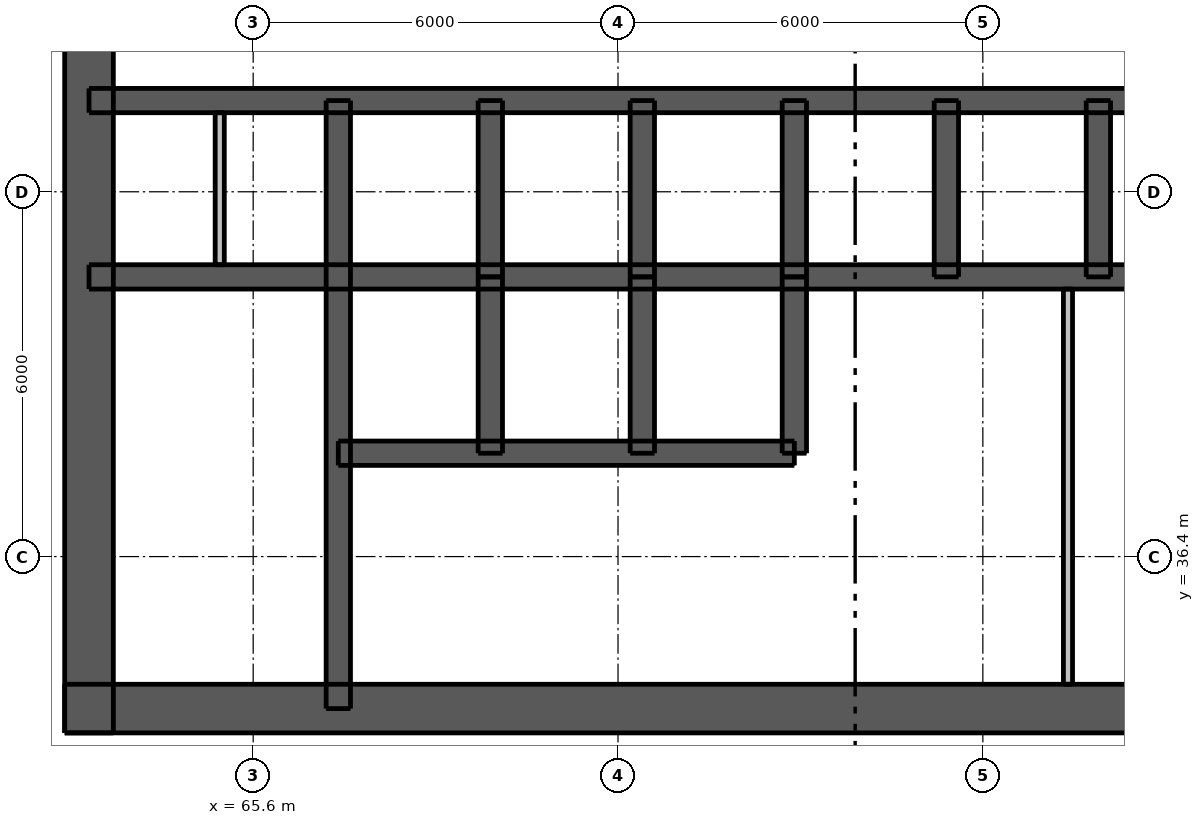
"""IFC4 building model, lengths in metres.
Left out: names, types, materials, properties, quantities, classifications, styles, units other than length and angle.
Written with IfcOpenShell. Run it as: python <this file> out.ifc"""

import sys

from ifc_helpers import new_model, si_unit, direction, frame, frame_2d, origin, place, context, subcontext, project, spatial, rectangle, extrude, element, fill, save


model = new_model("IFC4")
c1 = context("Model", 3, precision=1e-05, world=origin(), true_north=direction((0.0, 1.0)))
c2 = subcontext(c1, "Body", "Model", "MODEL_VIEW")
j1 = project(units=[si_unit("LENGTHUNIT", "METRE"), si_unit("PLANEANGLEUNIT", "RADIAN")], contexts=[c1])
p1 = place(None, origin())
s1 = spatial("IfcSite", under=j1, at=p1, CompositionType="ELEMENT")
p2 = place(p1, origin())
s2 = spatial("IfcBuilding", under=s1, at=p2, CompositionType="ELEMENT")
p3 = place(p2, frame((0.0, 0.0, 78.7)))
s3 = spatial("IfcBuildingStorey", under=s2, at=p3, CompositionType="ELEMENT", Elevation=78.7)
p4 = place(p3, frame((62.5, 33.9, 0.0), z_axis=(0.0, 0.0, 1.0), x_axis=(1.0, 0.0, 0.0)))
e1 = element("IfcWall", 1, at=p4, inside=s3, PredefinedType="SHEAR", context=c2, shape_type="SweptSolid", body=[
    extrude(rectangle(XDim=24.0, YDim=0.8, at=frame_2d((12.0, 0.0))), origin(), (0.0, 0.0, 1.0), 3.05),
])
p5 = place(p4, frame((2.0, 0.0, 0.0)))
e2 = element("IfcOpeningElement", 2, at=p5, cuts=e1, PredefinedType="OPENING", context=c2, shape_type="SweptSolid", body=[
    extrude(rectangle(XDim=1.1, YDim=2.1, at=frame_2d((0.55, 1.05))), frame((0.0, 0.41, 0.0), z_axis=(0.0, -1.0, 0.0), x_axis=(1.0, 0.0, 0.0)), (0.0, 0.0, 1.0), 0.82),
])
p6 = place(p4, frame((20.9, 0.0, 0.0)))
e3 = element("IfcOpeningElement", 3, at=p6, cuts=e1, PredefinedType="OPENING", context=c2, shape_type="SweptSolid", body=[
    extrude(rectangle(XDim=1.1, YDim=2.1, at=frame_2d((0.55, 1.05))), frame((0.0, 0.41, 0.0), z_axis=(0.0, -1.0, 0.0), x_axis=(1.0, 0.0, 0.0)), (0.0, 0.0, 1.0), 0.82),
])
p7 = place(p4, frame((8.0, 0.0, 0.0)))
e4 = element("IfcOpeningElement", 4, at=p7, cuts=e1, PredefinedType="OPENING", context=c2, shape_type="SweptSolid", body=[
    extrude(rectangle(XDim=1.1, YDim=2.1, at=frame_2d((0.55, 1.05))), frame((0.0, 0.41, 0.0), z_axis=(0.0, -1.0, 0.0), x_axis=(1.0, 0.0, 0.0)), (0.0, 0.0, 1.0), 0.82),
])
p8 = place(p4, frame((17.488, 0.0, 0.0)))
e5 = element("IfcOpeningElement", 5, at=p8, cuts=e1, PredefinedType="OPENING", context=c2, shape_type="SweptSolid", body=[
    extrude(rectangle(XDim=0.9, YDim=2.1, at=frame_2d((0.45, 1.05))), frame((0.0, 0.41, 0.0), z_axis=(0.0, -1.0, 0.0), x_axis=(1.0, 0.0, 0.0)), (0.0, 0.0, 1.0), 0.82),
])
p9 = place(p3, frame((62.9, 33.5, 0.0), z_axis=(0.0, 0.0, 1.0), x_axis=(0.0, 1.0, 0.0)))
e6 = element("IfcWall", 6, at=p9, inside=s3, PredefinedType="SHEAR", context=c2, shape_type="SweptSolid", body=[
    extrude(rectangle(XDim=24.0, YDim=0.8, at=frame_2d((12.0, 0.0))), origin(), (0.0, 0.0, 1.0), 3.05),
])
p10 = place(p9, frame((11.2, 0.0, 0.0)))
e7 = element("IfcOpeningElement", 7, at=p10, cuts=e6, PredefinedType="OPENING", context=c2, shape_type="SweptSolid", body=[
    extrude(rectangle(XDim=1.6, YDim=2.1, at=frame_2d((0.8, 1.05))), frame((0.0, 0.41, 0.0), z_axis=(0.0, -1.0, 0.0), x_axis=(1.0, 0.0, 0.0)), (0.0, 0.0, 1.0), 0.82),
])
p11 = place(p3, frame((62.9, 41.0, 0.0), z_axis=(0.0, 0.0, 1.0), x_axis=(1.0, 0.0, 0.0)))
e8 = element("IfcWall", 8, at=p11, inside=s3, PredefinedType="SHEAR", context=c2, shape_type="SweptSolid", body=[
    extrude(rectangle(XDim=23.2, YDim=0.4, at=frame_2d((11.6, 0.0))), origin(), (0.0, 0.0, 1.0), 3.05),
])
p12 = place(p3, frame((62.9, 43.9, 0.0), z_axis=(0.0, 0.0, 1.0), x_axis=(1.0, 0.0, 0.0)))
e9 = element("IfcWall", 9, at=p12, inside=s3, PredefinedType="SHEAR", context=c2, shape_type="SweptSolid", body=[
    extrude(rectangle(XDim=23.2, YDim=0.4, at=frame_2d((11.6, 0.0))), origin(), (0.0, 0.0, 1.0), 3.05),
])
p13 = place(p12, frame((0.825, 0.0, 0.0)))
e10 = element("IfcOpeningElement", 10, at=p13, cuts=e9, PredefinedType="OPENING", context=c2, shape_type="SweptSolid", body=[
    extrude(rectangle(XDim=0.9, YDim=2.1, at=frame_2d((0.45, 1.05))), frame((0.0, 0.21, 0.0), z_axis=(0.0, -1.0, 0.0), x_axis=(1.0, 0.0, 0.0)), (0.0, 0.0, 1.0), 0.42),
])
p14 = place(p12, frame((2.575, 0.0, 0.0)))
e11 = element("IfcOpeningElement", 11, at=p14, cuts=e9, PredefinedType="OPENING", context=c2, shape_type="SweptSolid", body=[
    extrude(rectangle(XDim=0.9, YDim=2.1, at=frame_2d((0.45, 1.05))), frame((0.0, 0.21, 0.0), z_axis=(0.0, -1.0, 0.0), x_axis=(1.0, 0.0, 0.0)), (0.0, 0.0, 1.0), 0.42),
])
p15 = place(p12, frame((20.6, 0.0, 0.0)))
e12 = element("IfcOpeningElement", 12, at=p15, cuts=e9, PredefinedType="OPENING", context=c2, shape_type="SweptSolid", body=[
    extrude(rectangle(XDim=0.9, YDim=2.1, at=frame_2d((0.45, 1.05))), frame((0.0, 0.21, 0.0), z_axis=(0.0, -1.0, 0.0), x_axis=(1.0, 0.0, 0.0)), (0.0, 0.0, 1.0), 0.42),
])
p16 = place(p12, frame((4.8, 0.0, 0.0)))
e13 = element("IfcOpeningElement", 13, at=p16, cuts=e9, PredefinedType="OPENING", context=c2, shape_type="SweptSolid", body=[
    extrude(rectangle(XDim=1.1, YDim=2.1, at=frame_2d((0.55, 1.05))), frame((0.0, 0.21, 0.0), z_axis=(0.0, -1.0, 0.0), x_axis=(1.0, 0.0, 0.0)), (0.0, 0.0, 1.0), 0.42),
])
p17 = place(p12, frame((7.3, 0.0, 0.0)))
e14 = element("IfcOpeningElement", 14, at=p17, cuts=e9, PredefinedType="OPENING", context=c2, shape_type="SweptSolid", body=[
    extrude(rectangle(XDim=1.1, YDim=2.1, at=frame_2d((0.55, 1.05))), frame((0.0, 0.21, 0.0), z_axis=(0.0, -1.0, 0.0), x_axis=(1.0, 0.0, 0.0)), (0.0, 0.0, 1.0), 0.42),
])
p18 = place(p12, frame((9.8, 0.0, 0.0)))
e15 = element("IfcOpeningElement", 15, at=p18, cuts=e9, PredefinedType="OPENING", context=c2, shape_type="SweptSolid", body=[
    extrude(rectangle(XDim=1.1, YDim=2.1, at=frame_2d((0.55, 1.05))), frame((0.0, 0.21, 0.0), z_axis=(0.0, -1.0, 0.0), x_axis=(1.0, 0.0, 0.0)), (0.0, 0.0, 1.0), 0.42),
])
p19 = place(p12, frame((12.3, 0.0, 0.0)))
e16 = element("IfcOpeningElement", 16, at=p19, cuts=e9, PredefinedType="OPENING", context=c2, shape_type="SweptSolid", body=[
    extrude(rectangle(XDim=1.1, YDim=2.1, at=frame_2d((0.55, 1.05))), frame((0.0, 0.21, 0.0), z_axis=(0.0, -1.0, 0.0), x_axis=(1.0, 0.0, 0.0)), (0.0, 0.0, 1.0), 0.42),
])
p20 = place(p12, frame((14.8, 0.0, 0.0)))
e17 = element("IfcOpeningElement", 17, at=p20, cuts=e9, PredefinedType="OPENING", context=c2, shape_type="SweptSolid", body=[
    extrude(rectangle(XDim=1.1, YDim=2.1, at=frame_2d((0.55, 1.05))), frame((0.0, 0.21, 0.0), z_axis=(0.0, -1.0, 0.0), x_axis=(1.0, 0.0, 0.0)), (0.0, 0.0, 1.0), 0.42),
])
p21 = place(p12, frame((17.3, 0.0, 0.0)))
e18 = element("IfcOpeningElement", 18, at=p21, cuts=e9, PredefinedType="OPENING", context=c2, shape_type="SweptSolid", body=[
    extrude(rectangle(XDim=1.1, YDim=2.1, at=frame_2d((0.55, 1.05))), frame((0.0, 0.21, 0.0), z_axis=(0.0, -1.0, 0.0), x_axis=(1.0, 0.0, 0.0)), (0.0, 0.0, 1.0), 0.42),
])
p22 = place(p3, frame((67.0, 33.9, 0.0), z_axis=(0.0, 0.0, 1.0), x_axis=(0.0, 1.0, 0.0)))
e19 = element("IfcWall", 19, at=p22, inside=s3, PredefinedType="SHEAR", context=c2, shape_type="SweptSolid", body=[
    extrude(rectangle(XDim=10.0, YDim=0.4, at=frame_2d((5.0, 0.0))), origin(), (0.0, 0.0, 1.0), 3.05),
])
p23 = place(p22, frame((0.6, 0.0, 0.0)))
e20 = element("IfcOpeningElement", 20, at=p23, cuts=e19, PredefinedType="OPENING", context=c2, shape_type="SweptSolid", body=[
    extrude(rectangle(XDim=1.1, YDim=2.1, at=frame_2d((0.55, 1.05))), frame((0.0, 0.21, 0.0), z_axis=(0.0, -1.0, 0.0), x_axis=(1.0, 0.0, 0.0)), (0.0, 0.0, 1.0), 0.42),
])
for number, where, z_axis, x_axis in (
    (21, (69.5, 41.0, 0.0), (0.0, 0.0, 1.0), (0.0, 1.0, 0.0)),
    (22, (72.0, 41.0, 0.0), (0.0, 0.0, 1.0), (0.0, 1.0, 0.0)),
    (23, (74.5, 41.0, 0.0), (0.0, 0.0, 1.0), (0.0, 1.0, 0.0)),
    (24, (77.0, 41.0, 0.0), (0.0, 0.0, 1.0), (0.0, 1.0, 0.0)),
    (25, (79.5, 41.0, 0.0), (0.0, 0.0, 1.0), (0.0, 1.0, 0.0)),
):
    element("IfcWall", number, at=place(p3, frame(where, z_axis=z_axis, x_axis=x_axis)), inside=s3, PredefinedType="SHEAR", context=c2, shape_type="SweptSolid", body=[
        extrude(rectangle(XDim=2.9, YDim=0.4, at=frame_2d((1.45, 0.0))), origin(), (0.0, 0.0, 1.0), 3.05),
    ])
p24 = place(p3, frame((67.0, 38.1, 0.0), z_axis=(0.0, 0.0, 1.0), x_axis=(1.0, 0.0, 0.0)))
e26 = element("IfcWall", 26, at=p24, inside=s3, PredefinedType="SHEAR", context=c2, shape_type="SweptSolid", body=[
    extrude(rectangle(XDim=7.5, YDim=0.4, at=frame_2d((3.75, 0.0))), origin(), (0.0, 0.0, 1.0), 3.05),
])
p25 = place(p24, frame((0.7, 0.0, 0.0)))
e27 = element("IfcOpeningElement", 27, at=p25, cuts=e26, PredefinedType="OPENING", context=c2, shape_type="SweptSolid", body=[
    extrude(rectangle(XDim=1.1, YDim=2.1, at=frame_2d((0.55, 1.05))), frame((0.0, 0.21, 0.0), z_axis=(0.0, -1.0, 0.0), x_axis=(1.0, 0.0, 0.0)), (0.0, 0.0, 1.0), 0.42),
])
p26 = place(p24, frame((3.2, 0.0, 0.0)))
e28 = element("IfcOpeningElement", 28, at=p26, cuts=e26, PredefinedType="OPENING", context=c2, shape_type="SweptSolid", body=[
    extrude(rectangle(XDim=1.1, YDim=2.1, at=frame_2d((0.55, 1.05))), frame((0.0, 0.21, 0.0), z_axis=(0.0, -1.0, 0.0), x_axis=(1.0, 0.0, 0.0)), (0.0, 0.0, 1.0), 0.42),
])
p27 = place(p24, frame((5.65, 0.0, 0.0)))
e29 = element("IfcOpeningElement", 29, at=p27, cuts=e26, PredefinedType="OPENING", context=c2, shape_type="SweptSolid", body=[
    extrude(rectangle(XDim=1.2, YDim=2.1, at=frame_2d((0.6, 1.05))), frame((0.0, 0.21, 0.0), z_axis=(0.0, -1.0, 0.0), x_axis=(1.0, 0.0, 0.0)), (0.0, 0.0, 1.0), 0.42),
])
for number, where, z_axis, x_axis in (
    (30, (69.5, 38.1, 0.0), (0.0, 0.0, 1.0), (0.0, 1.0, 0.0)),
    (31, (72.0, 38.1, 0.0), (0.0, 0.0, 1.0), (0.0, 1.0, 0.0)),
    (32, (74.5, 38.1, 0.0), (0.0, 0.0, 1.0), (0.0, 1.0, 0.0)),
):
    element("IfcWall", number, at=place(p3, frame(where, z_axis=z_axis, x_axis=x_axis)), inside=s3, PredefinedType="SHEAR", context=c2, shape_type="SweptSolid", body=[
        extrude(rectangle(XDim=2.9, YDim=0.4, at=frame_2d((1.45, 0.0))), origin(), (0.0, 0.0, 1.0), 3.05),
    ])
p28 = place(p3, frame((79.0, 34.3, 0.0), z_axis=(0.0, 0.0, 1.0), x_axis=(0.0, 1.0, 0.0)))
e33 = element("IfcWall", 33, at=p28, inside=s3, PredefinedType="PLUMBINGWALL", context=c2, shape_type="SweptSolid", body=[
    extrude(rectangle(XDim=6.5, YDim=0.15, at=frame_2d((3.25, 0.0))), origin(), (0.0, 0.0, 1.0), 3.05),
])
p29 = place(p3, frame((65.05, 41.2, 0.0), z_axis=(0.0, 0.0, 1.0), x_axis=(0.0, 1.0, 0.0)))
e34 = element("IfcWall", 34, at=p29, inside=s3, PredefinedType="PLUMBINGWALL", context=c2, shape_type="SweptSolid", body=[
    extrude(rectangle(XDim=2.5, YDim=0.15, at=frame_2d((1.25, 0.0))), origin(), (0.0, 0.0, 1.0), 3.05),
])
p30 = place(p5, origin())
e35 = element("IfcDoor", 35, at=p30, inside=s3, OperationType="SINGLE_SWING_LEFT", PredefinedType="DOOR", context=c2, shape_type="SweptSolid", body=[
    extrude(rectangle(XDim=1.1, YDim=2.1, at=frame_2d((0.55, 1.05))), frame((0.0, 0.388, 0.0), z_axis=(0.0, -1.0, 0.0), x_axis=(1.0, 0.0, 0.0)), (0.0, 0.0, 1.0), 0.05),
])
fill(e2, e35)
p31 = place(p7, origin())
e36 = element("IfcDoor", 36, at=p31, inside=s3, OperationType="SINGLE_SWING_LEFT", PredefinedType="DOOR", context=c2, shape_type="SweptSolid", body=[
    extrude(rectangle(XDim=1.1, YDim=2.1, at=frame_2d((0.55, 1.05))), frame((0.0, 0.388, 0.0), z_axis=(0.0, -1.0, 0.0), x_axis=(1.0, 0.0, 0.0)), (0.0, 0.0, 1.0), 0.05),
])
fill(e4, e36)
p32 = place(p23, origin())
e37 = element("IfcDoor", 37, at=p32, inside=s3, OperationType="SINGLE_SWING_RIGHT", PredefinedType="DOOR", context=c2, shape_type="SweptSolid", body=[
    extrude(rectangle(XDim=1.1, YDim=2.1, at=frame_2d((0.55, 1.05))), frame((0.0, -0.138, 0.0), z_axis=(0.0, -1.0, 0.0), x_axis=(1.0, 0.0, 0.0)), (0.0, 0.0, 1.0), 0.05),
])
fill(e20, e37)
p33 = place(p13, origin())
e38 = element("IfcDoor", 38, at=p33, inside=s3, OperationType="SINGLE_SWING_LEFT", PredefinedType="DOOR", context=c2, shape_type="SweptSolid", body=[
    extrude(rectangle(XDim=0.9, YDim=2.1, at=frame_2d((0.45, 1.05))), frame((0.0, -0.138, 0.0), z_axis=(0.0, -1.0, 0.0), x_axis=(1.0, 0.0, 0.0)), (0.0, 0.0, 1.0), 0.05),
])
fill(e10, e38)
p34 = place(p14, origin())
e39 = element("IfcDoor", 39, at=p34, inside=s3, OperationType="SINGLE_SWING_RIGHT", PredefinedType="DOOR", context=c2, shape_type="SweptSolid", body=[
    extrude(rectangle(XDim=0.9, YDim=2.1, at=frame_2d((0.45, 1.05))), frame((0.0, -0.138, 0.0), z_axis=(0.0, -1.0, 0.0), x_axis=(1.0, 0.0, 0.0)), (0.0, 0.0, 1.0), 0.05),
])
fill(e11, e39)
p35 = place(p16, origin())
e40 = element("IfcDoor", 40, at=p35, inside=s3, OperationType="DOUBLE_DOOR_SLIDING", PredefinedType="DOOR", context=c2, shape_type="SweptSolid", body=[
    extrude(rectangle(XDim=1.1, YDim=2.1, at=frame_2d((0.55, 1.05))), frame((0.0, 0.025, 0.0), z_axis=(0.0, -1.0, 0.0), x_axis=(1.0, 0.0, 0.0)), (0.0, 0.0, 1.0), 0.05),
])
fill(e13, e40)
p36 = place(p17, origin())
e41 = element("IfcDoor", 41, at=p36, inside=s3, OperationType="DOUBLE_DOOR_SLIDING", PredefinedType="DOOR", context=c2, shape_type="SweptSolid", body=[
    extrude(rectangle(XDim=1.1, YDim=2.1, at=frame_2d((0.55, 1.05))), frame((0.0, 0.025, 0.0), z_axis=(0.0, -1.0, 0.0), x_axis=(1.0, 0.0, 0.0)), (0.0, 0.0, 1.0), 0.05),
])
fill(e14, e41)
p37 = place(p18, origin())
e42 = element("IfcDoor", 42, at=p37, inside=s3, OperationType="DOUBLE_DOOR_SLIDING", PredefinedType="DOOR", context=c2, shape_type="SweptSolid", body=[
    extrude(rectangle(XDim=1.1, YDim=2.1, at=frame_2d((0.55, 1.05))), frame((0.0, 0.025, 0.0), z_axis=(0.0, -1.0, 0.0), x_axis=(1.0, 0.0, 0.0)), (0.0, 0.0, 1.0), 0.05),
])
fill(e15, e42)
p38 = place(p19, origin())
e43 = element("IfcDoor", 43, at=p38, inside=s3, OperationType="DOUBLE_DOOR_SLIDING", PredefinedType="DOOR", context=c2, shape_type="SweptSolid", body=[
    extrude(rectangle(XDim=1.1, YDim=2.1, at=frame_2d((0.55, 1.05))), frame((0.0, 0.025, 0.0), z_axis=(0.0, -1.0, 0.0), x_axis=(1.0, 0.0, 0.0)), (0.0, 0.0, 1.0), 0.05),
])
fill(e16, e43)
p39 = place(p20, origin())
e44 = element("IfcDoor", 44, at=p39, inside=s3, OperationType="DOUBLE_DOOR_SLIDING", PredefinedType="DOOR", context=c2, shape_type="SweptSolid", body=[
    extrude(rectangle(XDim=1.1, YDim=2.1, at=frame_2d((0.55, 1.05))), frame((0.0, 0.025, 0.0), z_axis=(0.0, -1.0, 0.0), x_axis=(1.0, 0.0, 0.0)), (0.0, 0.0, 1.0), 0.05),
])
fill(e17, e44)
p40 = place(p25, origin())
e45 = element("IfcDoor", 45, at=p40, inside=s3, OperationType="DOUBLE_DOOR_SLIDING", PredefinedType="DOOR", context=c2, shape_type="SweptSolid", body=[
    extrude(rectangle(XDim=1.1, YDim=2.1, at=frame_2d((0.55, 1.05))), frame((0.0, 0.025, 0.0), z_axis=(0.0, -1.0, 0.0), x_axis=(1.0, 0.0, 0.0)), (0.0, 0.0, 1.0), 0.05),
])
fill(e27, e45)
p41 = place(p26, origin())
e46 = element("IfcDoor", 46, at=p41, inside=s3, OperationType="DOUBLE_DOOR_SLIDING", PredefinedType="DOOR", context=c2, shape_type="SweptSolid", body=[
    extrude(rectangle(XDim=1.1, YDim=2.1, at=frame_2d((0.55, 1.05))), frame((0.0, 0.025, 0.0), z_axis=(0.0, -1.0, 0.0), x_axis=(1.0, 0.0, 0.0)), (0.0, 0.0, 1.0), 0.05),
])
fill(e28, e46)
p42 = place(p27, origin())
e47 = element("IfcDoor", 47, at=p42, inside=s3, OperationType="DOUBLE_DOOR_SLIDING", PredefinedType="DOOR", context=c2, shape_type="SweptSolid", body=[
    extrude(rectangle(XDim=1.2, YDim=2.1, at=frame_2d((0.6, 1.05))), frame((0.0, 0.025, 0.0), z_axis=(0.0, -1.0, 0.0), x_axis=(1.0, 0.0, 0.0)), (0.0, 0.0, 1.0), 0.05),
])
fill(e29, e47)
save(model, sys.argv[1])
